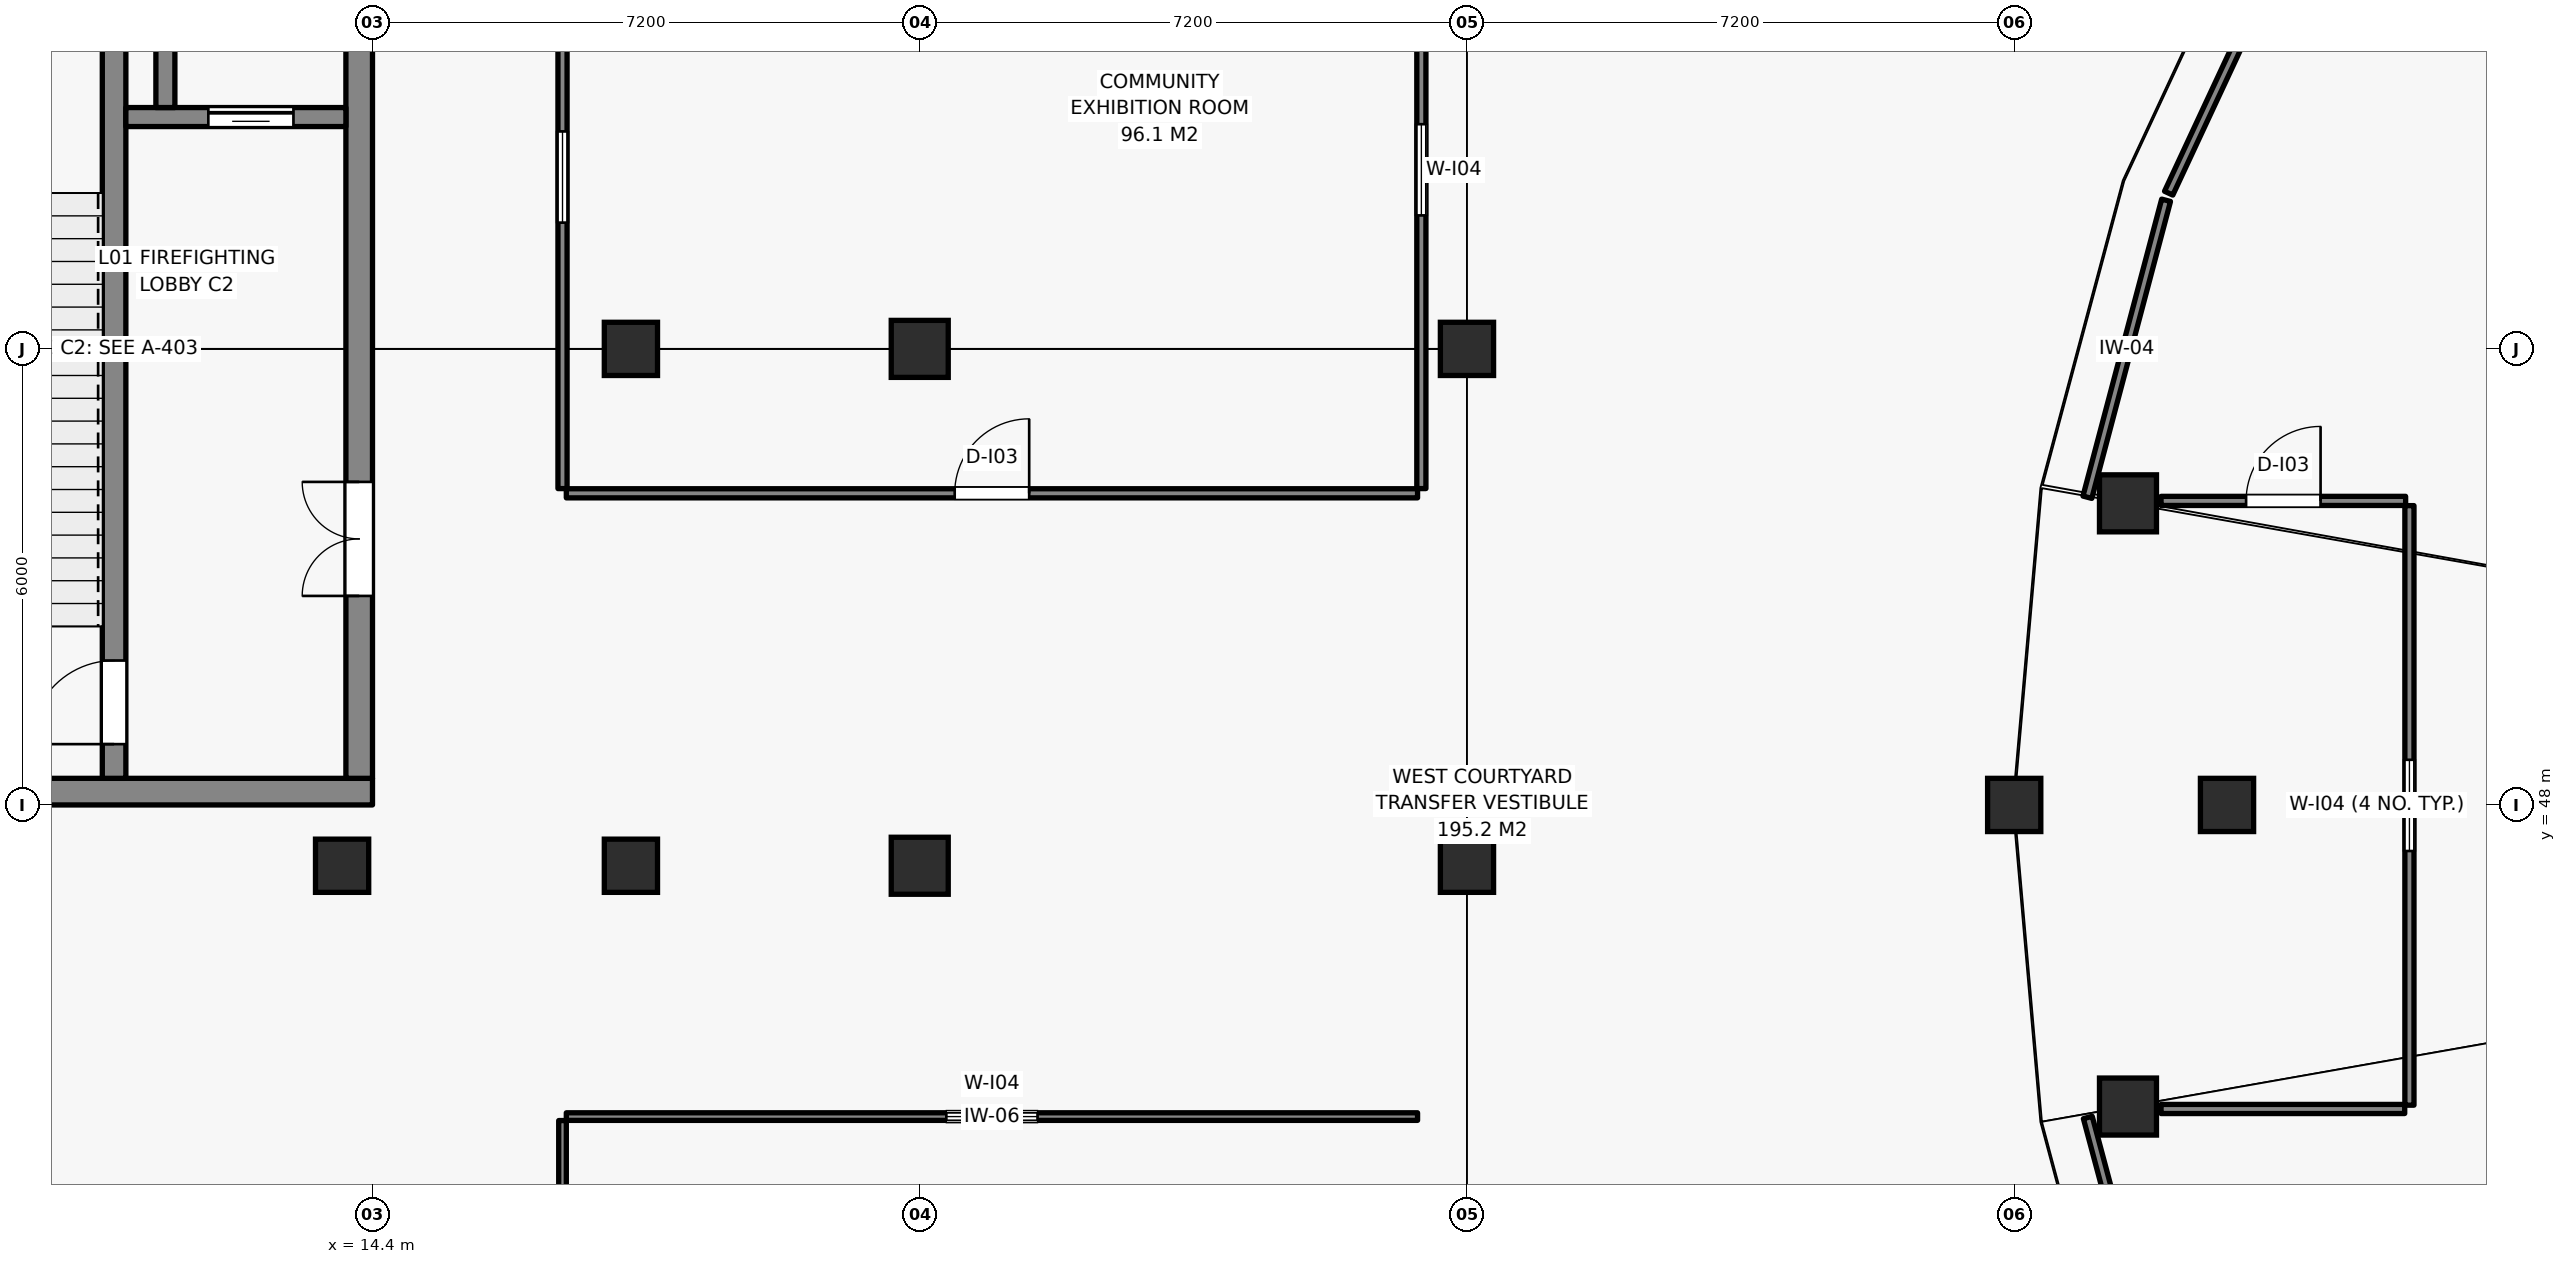
"""IFC4 building model, lengths in metres.
Left out: names, types, materials, properties, quantities, classifications, styles, units other than length and angle.
Written with IfcOpenShell. Run it as: python <this file> out.ifc"""

import sys

from ifc_helpers import new_model, si_unit, direction, frame, frame_2d, origin, origin_2d, place, context, subcontext, project, spatial, rectangle, circle, extrude, element, fill, save


model = new_model("IFC4")
c1 = context("Model", 3, precision=1e-05, world=origin(), true_north=direction((0.0, 1.0)))
c2 = subcontext(c1, "Body", "Model", "MODEL_VIEW")
j1 = project(units=[si_unit("LENGTHUNIT", "METRE"), si_unit("PLANEANGLEUNIT", "RADIAN")], contexts=[c1])
p1 = place(None, origin())
s1 = spatial("IfcSite", under=j1, at=p1, CompositionType="ELEMENT")
p2 = place(p1, origin())
s2 = spatial("IfcBuilding", under=s1, at=p2, CompositionType="ELEMENT")
p3 = place(p2, origin())
s3 = spatial("IfcBuildingStorey", under=s2, at=p3, CompositionType="ELEMENT", Elevation=0.0)
p4 = place(p3, frame((7.2, 48.175, 0.0), z_axis=(0.0, 0.0, 1.0), x_axis=(1.0, 0.0, 0.0)))
e1 = element("IfcWall", 1, at=p4, inside=s3, PredefinedType="SHEAR", context=c2, shape_type="SweptSolid", body=[
    extrude(rectangle(XDim=7.2, YDim=0.35, at=frame_2d((3.6, 0.0))), origin(), (0.0, 0.0, 1.0), 5.75),
])
p5 = place(p3, frame((14.225, 48.35, 0.0), z_axis=(0.0, 0.0, 1.0), x_axis=(0.0, 1.0, 0.0)))
e2 = element("IfcWall", 2, at=p5, inside=s3, PredefinedType="SHEAR", context=c2, shape_type="SweptSolid", body=[
    extrude(rectangle(XDim=11.3, YDim=0.35, at=frame_2d((5.65, 0.0))), origin(), (0.0, 0.0, 1.0), 5.75),
])
p6 = place(p5, frame((2.4, 0.0, 0.0)))
e3 = element("IfcOpeningElement", 3, at=p6, cuts=e2, PredefinedType="OPENING", context=c2, shape_type="SweptSolid", body=[
    extrude(rectangle(XDim=1.5, YDim=2.15, at=frame_2d((0.75, 1.075))), frame((0.0, 0.185, 0.0), z_axis=(0.0, -1.0, 0.0), x_axis=(1.0, 0.0, 0.0)), (0.0, 0.0, 1.0), 0.37),
])
p7 = place(p3, frame((11.0, 48.35, 0.0), z_axis=(0.0, 0.0, 1.0), x_axis=(0.0, 1.0, 0.0)))
e4 = element("IfcWall", 4, at=p7, inside=s3, PredefinedType="SHEAR", context=c2, shape_type="SweptSolid", body=[
    extrude(rectangle(XDim=11.3, YDim=0.31, at=frame_2d((5.65, 0.0))), origin(), (0.0, 0.0, 1.0), 5.75),
])
p8 = place(p7, frame((0.45, 0.0, 0.0)))
e5 = element("IfcOpeningElement", 5, at=p8, cuts=e4, PredefinedType="OPENING", context=c2, shape_type="SweptSolid", body=[
    extrude(rectangle(XDim=1.1, YDim=2.15, at=frame_2d((0.55, 1.075))), frame((0.0, 0.165, 0.0), z_axis=(0.0, -1.0, 0.0), x_axis=(1.0, 0.0, 0.0)), (0.0, 0.0, 1.0), 0.33),
])
for number, where, z_axis, x_axis in (
    (6, (14.0, 47.2, 0.0), (0.0, 0.0, 1.0), (1.0, 0.0, 0.0)),
    (7, (17.8, 47.2, 0.0), (0.0, 0.0, 1.0), (1.0, 0.0, 0.0)),
    (8, (17.8, 54.0, 0.0), (0.0, 0.0, 1.0), (1.0, 0.0, 0.0)),
):
    element("IfcColumn", number, at=place(p3, frame(where, z_axis=z_axis, x_axis=x_axis)), inside=s3, PredefinedType="COLUMN", context=c2, shape_type="SweptSolid", body=[
        extrude(rectangle(XDim=0.7, YDim=0.7, at=origin_2d()), origin(), (0.0, 0.0, 1.0), 6.0),
    ])
for number, where, z_axis, x_axis in (
    (9, (21.6, 47.2, 0.0), (0.0, 0.0, 1.0), (1.0, 0.0, 0.0)),
    (10, (21.6, 54.0, 0.0), (0.0, 0.0, 1.0), (1.0, 0.0, 0.0)),
):
    element("IfcColumn", number, at=place(p3, frame(where, z_axis=z_axis, x_axis=x_axis)), inside=s3, PredefinedType="COLUMN", context=c2, shape_type="SweptSolid", body=[
        extrude(rectangle(XDim=0.75, YDim=0.75, at=origin_2d()), origin(), (0.0, 0.0, 1.0), 6.0),
    ])
for number, where, z_axis, x_axis in (
    (11, (28.8, 47.2, 0.0), (0.0, 0.0, 1.0), (1.0, 0.0, 0.0)),
    (12, (28.8, 54.0, 0.0), (0.0, 0.0, 1.0), (1.0, 0.0, 0.0)),
    (13, (36.0, 48.0, 0.0), (0.0, 0.0, 1.0), (1.0, 0.0, 0.0)),
    (14, (38.8, 48.0, 0.0), (0.0, 0.0, 1.0), (1.0, 0.0, 0.0)),
):
    element("IfcColumn", number, at=place(p3, frame(where, z_axis=z_axis, x_axis=x_axis)), inside=s3, PredefinedType="COLUMN", context=c2, shape_type="SweptSolid", body=[
        extrude(rectangle(XDim=0.7, YDim=0.7, at=origin_2d()), origin(), (0.0, 0.0, 1.0), 6.0),
    ])
for number, where, z_axis, x_axis in (
    (15, (37.497, 51.968, 0.0), (0.0, 0.0, 1.0), (1.0, 0.0, 0.0)),
    (16, (37.497, 44.032, 0.0), (0.0, 0.0, 1.0), (1.0, 0.0, 0.0)),
):
    element("IfcColumn", number, at=place(p3, frame(where, z_axis=z_axis, x_axis=x_axis)), inside=s3, PredefinedType="COLUMN", context=c2, shape_type="SweptSolid", body=[
        extrude(circle(Radius=0.375, at=origin_2d()), origin(), (0.0, 0.0, 1.0), 6.0),
    ])
p9 = place(p3, frame((11.155, 57.05, 0.0), z_axis=(0.0, 0.0, 1.0), x_axis=(1.0, 0.0, 0.0)))
e17 = element("IfcWall", 17, at=p9, inside=s3, PredefinedType="SHEAR", context=c2, shape_type="SweptSolid", body=[
    extrude(rectangle(XDim=2.895, YDim=0.25, at=frame_2d((1.448, 0.0))), origin(), (0.0, 0.0, 1.0), 5.75),
])
p10 = place(p9, frame((1.085, 0.0, 0.0)))
e18 = element("IfcOpeningElement", 18, at=p10, cuts=e17, PredefinedType="OPENING", context=c2, shape_type="SweptSolid", body=[
    extrude(rectangle(XDim=1.12, YDim=2.15, at=frame_2d((0.56, 1.075))), frame((0.0, 0.135, 0.0), z_axis=(0.0, -1.0, 0.0), x_axis=(1.0, 0.0, 0.0)), (0.0, 0.0, 1.0), 0.27),
])
p11 = place(p3, frame((11.675, 57.175, 0.0), z_axis=(0.0, 0.0, 1.0), x_axis=(0.0, 1.0, 0.0)))
e19 = element("IfcWall", 19, at=p11, inside=s3, PredefinedType="SHEAR", context=c2, shape_type="SweptSolid", body=[
    extrude(rectangle(XDim=2.475, YDim=0.25, at=frame_2d((1.237, 0.0))), origin(), (0.0, 0.0, 1.0), 5.75),
])
p12 = place(p3, frame((37.998, 55.955, 0.0), z_axis=(0.0, 0.0, 1.0), x_axis=(-0.256184766592, -0.966627831881, 0.0)))
e20 = element("IfcWall", 20, at=p12, inside=s3, PredefinedType="PARTITIONING", context=c2, shape_type="SweptSolid", body=[
    extrude(rectangle(XDim=4.042, YDim=0.12, at=frame_2d((2.021, 0.0))), origin(), (0.0, 0.0, 1.0), 5.72),
])
p13 = place(p3, frame((37.932, 52.0, 0.0), z_axis=(0.0, 0.0, 1.0), x_axis=(1.0, 0.0, 0.0)))
e21 = element("IfcWall", 21, at=p13, inside=s3, PredefinedType="PARTITIONING", context=c2, shape_type="SweptSolid", body=[
    extrude(rectangle(XDim=3.218, YDim=0.12, at=frame_2d((1.609, 0.0))), origin(), (0.0, 0.0, 1.0), 4.835),
])
p14 = place(p13, frame((1.119, 0.0, 0.0)))
e22 = element("IfcOpeningElement", 22, at=p14, cuts=e21, PredefinedType="OPENING", context=c2, shape_type="SweptSolid", body=[
    extrude(rectangle(XDim=0.98, YDim=2.15, at=frame_2d((0.49, 1.075))), frame((0.0, 0.07, 0.0), z_axis=(0.0, -1.0, 0.0), x_axis=(1.0, 0.0, 0.0)), (0.0, 0.0, 1.0), 0.14),
])
p15 = place(p3, frame((41.2, 51.938, 0.0), z_axis=(0.0, 0.0, 1.0), x_axis=(0.0, -1.0, 0.0)))
e23 = element("IfcWall", 23, at=p15, inside=s3, PredefinedType="PARTITIONING", context=c2, shape_type="SweptSolid", body=[
    extrude(rectangle(XDim=7.888, YDim=0.12, at=frame_2d((3.944, 0.0))), origin(), (0.0, 0.0, 1.0), 5.095),
])
p16 = place(p15, frame((3.344, 0.0, 1.05)))
e24 = element("IfcOpeningElement", 24, at=p16, cuts=e23, PredefinedType="OPENING", context=c2, shape_type="SweptSolid", body=[
    extrude(rectangle(XDim=1.2, YDim=1.1, at=frame_2d((0.6, 0.55))), frame((0.0, 0.07, 0.0), z_axis=(0.0, -1.0, 0.0), x_axis=(1.0, 0.0, 0.0)), (0.0, 0.0, 1.0), 0.14),
])
p17 = place(p3, frame((41.138, 44.0, 0.0), z_axis=(0.0, 0.0, 1.0), x_axis=(-1.0, 0.0, 0.0)))
e25 = element("IfcWall", 25, at=p17, inside=s3, PredefinedType="PARTITIONING", context=c2, shape_type="SweptSolid", body=[
    extrude(rectangle(XDim=3.206, YDim=0.12, at=frame_2d((1.603, 0.0))), origin(), (0.0, 0.0, 1.0), 4.835),
])
p18 = place(p3, frame((36.969, 43.888, 0.0), z_axis=(0.0, 0.0, 1.0), x_axis=(0.258815828408, -0.965926688194, 0.0)))
e26 = element("IfcWall", 26, at=p18, inside=s3, PredefinedType="PARTITIONING", context=c2, shape_type="SweptSolid", body=[
    extrude(rectangle(XDim=3.979, YDim=0.12, at=frame_2d((1.989, 0.0))), origin(), (0.0, 0.0, 1.0), 5.72),
])
p19 = place(p3, frame((39.714, 59.655, 0.0), z_axis=(0.0, 0.0, 1.0), x_axis=(-0.422626808325, -0.90630380165, 0.0)))
e27 = element("IfcWall", 27, at=p19, inside=s3, PredefinedType="PARTITIONING", context=c2, shape_type="SweptSolid", body=[
    extrude(rectangle(XDim=3.979, YDim=0.12, at=frame_2d((1.99, 0.0))), origin(), (0.0, 0.0, 1.0), 4.835),
])
p20 = place(p3, frame((28.15, 43.9, 0.0), z_axis=(0.0, 0.0, 1.0), x_axis=(-1.0, 0.0, 0.0)))
e28 = element("IfcWall", 28, at=p20, inside=s3, PredefinedType="MOVABLE", context=c2, shape_type="SweptSolid", body=[
    extrude(rectangle(XDim=11.2, YDim=0.1, at=frame_2d((5.6, 0.0))), origin(), (0.0, 0.0, 1.0), 5.375),
])
p21 = place(p20, frame((5.0, 0.0, 1.05)))
e29 = element("IfcOpeningElement", 29, at=p21, cuts=e28, PredefinedType="OPENING", context=c2, shape_type="SweptSolid", body=[
    extrude(rectangle(XDim=1.2, YDim=1.1, at=frame_2d((0.6, 0.55))), frame((0.0, 0.06, 0.0), z_axis=(0.0, -1.0, 0.0), x_axis=(1.0, 0.0, 0.0)), (0.0, 0.0, 1.0), 0.12),
])
p22 = place(p3, frame((16.9, 43.848, 0.0), z_axis=(0.0, 0.0, 1.0), x_axis=(0.0, -1.0, 0.0)))
e30 = element("IfcWall", 30, at=p22, inside=s3, PredefinedType="MOVABLE", context=c2, shape_type="SweptSolid", body=[
    extrude(rectangle(XDim=23.146, YDim=0.1, at=frame_2d((11.573, 0.0))), origin(), (0.0, 0.0, 1.0), 5.485),
])
p23 = place(p22, frame((10.573, 0.0, 1.05)))
e31 = element("IfcOpeningElement", 31, at=p23, cuts=e30, PredefinedType="OPENING", context=c2, shape_type="SweptSolid", body=[
    extrude(rectangle(XDim=2.0, YDim=1.2, at=frame_2d((1.0, 0.6))), frame((0.0, 0.06, 0.0), z_axis=(0.0, -1.0, 0.0), x_axis=(1.0, 0.0, 0.0)), (0.0, 0.0, 1.0), 0.12),
])
p24 = place(p3, frame((16.95, 52.1, 0.0), z_axis=(0.0, 0.0, 1.0), x_axis=(1.0, 0.0, 0.0)))
e32 = element("IfcWall", 32, at=p24, inside=s3, PredefinedType="PARTITIONING", context=c2, shape_type="SweptSolid", body=[
    extrude(rectangle(XDim=11.2, YDim=0.12, at=frame_2d((5.6, 0.0))), origin(), (0.0, 0.0, 1.0), 5.345),
])
p25 = place(p24, frame((5.11, 0.0, 0.0)))
e33 = element("IfcOpeningElement", 33, at=p25, cuts=e32, PredefinedType="OPENING", context=c2, shape_type="SweptSolid", body=[
    extrude(rectangle(XDim=0.98, YDim=2.15, at=frame_2d((0.49, 1.075))), frame((0.0, 0.07, 0.0), z_axis=(0.0, -1.0, 0.0), x_axis=(1.0, 0.0, 0.0)), (0.0, 0.0, 1.0), 0.14),
])
p26 = place(p3, frame((28.2, 52.162, 0.0), z_axis=(0.0, 0.0, 1.0), x_axis=(0.0, 1.0, 0.0)))
e34 = element("IfcWall", 34, at=p26, inside=s3, PredefinedType="PARTITIONING", context=c2, shape_type="SweptSolid", body=[
    extrude(rectangle(XDim=8.388, YDim=0.12, at=frame_2d((4.194, 0.0))), origin(), (0.0, 0.0, 1.0), 5.295),
])
p27 = place(p26, frame((3.594, 0.0, 1.05)))
e35 = element("IfcOpeningElement", 35, at=p27, cuts=e34, PredefinedType="OPENING", context=c2, shape_type="SweptSolid", body=[
    extrude(rectangle(XDim=1.2, YDim=1.1, at=frame_2d((0.6, 0.55))), frame((0.0, 0.07, 0.0), z_axis=(0.0, -1.0, 0.0), x_axis=(1.0, 0.0, 0.0)), (0.0, 0.0, 1.0), 0.14),
])
p28 = place(p3, frame((16.9, 60.36, 0.0), z_axis=(0.0, 0.0, 1.0), x_axis=(0.0, -1.0, 0.0)))
e36 = element("IfcWall", 36, at=p28, inside=s3, PredefinedType="PARTITIONING", context=c2, shape_type="SweptSolid", body=[
    extrude(rectangle(XDim=8.198, YDim=0.12, at=frame_2d((4.099, 0.0))), origin(), (0.0, 0.0, 1.0), 5.72),
])
p29 = place(p28, frame((3.499, 0.0, 1.05)))
e37 = element("IfcOpeningElement", 37, at=p29, cuts=e36, PredefinedType="OPENING", context=c2, shape_type="SweptSolid", body=[
    extrude(rectangle(XDim=1.2, YDim=1.1, at=frame_2d((0.6, 0.55))), frame((0.0, 0.07, 0.0), z_axis=(0.0, -1.0, 0.0), x_axis=(1.0, 0.0, 0.0)), (0.0, 0.0, 1.0), 0.14),
])
p30 = place(p10, origin())
e38 = element("IfcDoor", 38, at=p30, inside=s3, OperationType="SLIDING_TO_LEFT", PredefinedType="DOOR", context=c2, shape_type="SweptSolid", body=[
    extrude(rectangle(XDim=1.12, YDim=2.15, at=frame_2d((0.56, 1.075))), frame((0.0, 0.025, 0.0), z_axis=(0.0, -1.0, 0.0), x_axis=(1.0, 0.0, 0.0)), (0.0, 0.0, 1.0), 0.05),
])
fill(e18, e38)
p31 = place(p6, origin())
e39 = element("IfcDoor", 39, at=p31, inside=s3, OperationType="DOUBLE_DOOR_SINGLE_SWING", PredefinedType="DOOR", context=c2, shape_type="SweptSolid", body=[
    extrude(rectangle(XDim=1.5, YDim=2.15, at=frame_2d((0.75, 1.075))), frame((0.0, 0.025, 0.0), z_axis=(0.0, -1.0, 0.0), x_axis=(1.0, 0.0, 0.0)), (0.0, 0.0, 1.0), 0.05),
])
fill(e3, e39)
p32 = place(p8, origin())
e40 = element("IfcDoor", 40, at=p32, inside=s3, OperationType="SINGLE_SWING_LEFT", PredefinedType="DOOR", context=c2, shape_type="SweptSolid", body=[
    extrude(rectangle(XDim=1.1, YDim=2.15, at=frame_2d((0.55, 1.075))), frame((0.0, 0.025, 0.0), z_axis=(0.0, -1.0, 0.0), x_axis=(1.0, 0.0, 0.0)), (0.0, 0.0, 1.0), 0.05),
])
fill(e5, e40)
p33 = place(p14, origin())
e41 = element("IfcDoor", 41, at=p33, inside=s3, OperationType="SINGLE_SWING_RIGHT", PredefinedType="DOOR", context=c2, shape_type="SweptSolid", body=[
    extrude(rectangle(XDim=0.98, YDim=2.15, at=frame_2d((0.49, 1.075))), frame((0.0, 0.025, 0.0), z_axis=(0.0, -1.0, 0.0), x_axis=(1.0, 0.0, 0.0)), (0.0, 0.0, 1.0), 0.05),
])
fill(e22, e41)
p34 = place(p25, origin())
e42 = element("IfcDoor", 42, at=p34, inside=s3, OperationType="SINGLE_SWING_RIGHT", PredefinedType="DOOR", context=c2, shape_type="SweptSolid", body=[
    extrude(rectangle(XDim=0.98, YDim=2.15, at=frame_2d((0.49, 1.075))), frame((0.0, 0.025, 0.0), z_axis=(0.0, -1.0, 0.0), x_axis=(1.0, 0.0, 0.0)), (0.0, 0.0, 1.0), 0.05),
])
fill(e33, e42)
p35 = place(p16, origin())
e43 = element("IfcWindow", 43, at=p35, inside=s3, PartitioningType="SINGLE_PANEL", PredefinedType="WINDOW", context=c2, shape_type="SweptSolid", body=[
    extrude(rectangle(XDim=1.2, YDim=1.1, at=frame_2d((0.6, 0.55))), frame((0.0, 0.03, 0.0), z_axis=(0.0, -1.0, 0.0), x_axis=(1.0, 0.0, 0.0)), (0.0, 0.0, 1.0), 0.06),
])
fill(e24, e43)
p36 = place(p21, origin())
e44 = element("IfcWindow", 44, at=p36, inside=s3, PartitioningType="SINGLE_PANEL", PredefinedType="WINDOW", context=c2, shape_type="SweptSolid", body=[
    extrude(rectangle(XDim=1.2, YDim=1.1, at=frame_2d((0.6, 0.55))), frame((0.0, 0.03, 0.0), z_axis=(0.0, -1.0, 0.0), x_axis=(1.0, 0.0, 0.0)), (0.0, 0.0, 1.0), 0.06),
])
fill(e29, e44)
p37 = place(p27, origin())
e45 = element("IfcWindow", 45, at=p37, inside=s3, PartitioningType="SINGLE_PANEL", PredefinedType="WINDOW", context=c2, shape_type="SweptSolid", body=[
    extrude(rectangle(XDim=1.2, YDim=1.1, at=frame_2d((0.6, 0.55))), frame((0.0, 0.03, 0.0), z_axis=(0.0, -1.0, 0.0), x_axis=(1.0, 0.0, 0.0)), (0.0, 0.0, 1.0), 0.06),
])
fill(e35, e45)
p38 = place(p29, origin())
e46 = element("IfcWindow", 46, at=p38, inside=s3, PartitioningType="SINGLE_PANEL", PredefinedType="WINDOW", context=c2, shape_type="SweptSolid", body=[
    extrude(rectangle(XDim=1.2, YDim=1.1, at=frame_2d((0.6, 0.55))), frame((0.0, 0.03, 0.0), z_axis=(0.0, -1.0, 0.0), x_axis=(1.0, 0.0, 0.0)), (0.0, 0.0, 1.0), 0.06),
])
fill(e37, e46)
save(model, sys.argv[1])
